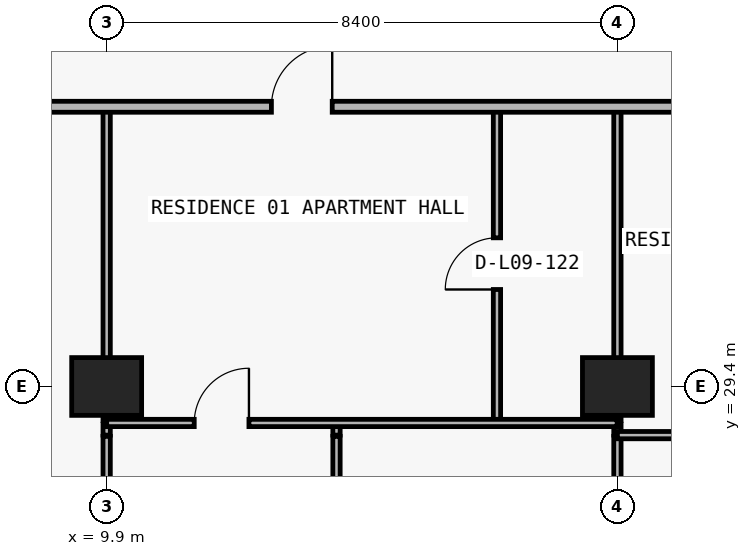
"""IFC4 building model, lengths in metres.
Left out: names, types, materials, properties, quantities, classifications, styles, units other than length and angle.
Written with IfcOpenShell. Run it as: python <this file> out.ifc"""

import sys

from ifc_helpers import new_model, si_unit, direction, frame, frame_2d, origin, origin_2d, place, context, subcontext, project, spatial, rectangle, extrude, element, fill, save


model = new_model("IFC4")
c1 = context("Model", 3, precision=1e-05, world=origin(), true_north=direction((0.0, 1.0)))
c2 = subcontext(c1, "Body", "Model", "MODEL_VIEW")
j1 = project(units=[si_unit("LENGTHUNIT", "METRE"), si_unit("PLANEANGLEUNIT", "RADIAN")], contexts=[c1])
p1 = place(None, origin())
s1 = spatial("IfcSite", under=j1, at=p1, CompositionType="ELEMENT")
p2 = place(p1, origin())
s2 = spatial("IfcBuilding", under=s1, at=p2, CompositionType="ELEMENT")
p3 = place(p2, frame((0.0, 0.0, 39.9)))
s3 = spatial("IfcBuildingStorey", under=s2, at=p3, CompositionType="ELEMENT", Elevation=39.9)
for number, where, z_axis, x_axis in (
    (1, (9.9, 29.4, 0.0), (0.0, 0.0, 1.0), (1.0, 0.0, 0.0)),
    (2, (18.3, 29.4, 0.0), (0.0, 0.0, 1.0), (1.0, 0.0, 0.0)),
):
    element("IfcColumn", number, at=place(p3, frame(where, z_axis=z_axis, x_axis=x_axis)), inside=s3, PredefinedType="COLUMN", context=c2, shape_type="SweptSolid", body=[
        extrude(rectangle(XDim=1.15, YDim=0.95, at=origin_2d()), origin(), (0.0, 0.0, 1.0), 3.05),
    ])
p4 = place(p3, frame((9.9, 24.2, 0.0), z_axis=(0.0, 0.0, 1.0), x_axis=(0.0, 1.0, 0.0)))
e3 = element("IfcWall", 3, at=p4, inside=s3, PredefinedType="PARTITIONING", context=c2, shape_type="SweptSolid", body=[
    extrude(rectangle(XDim=4.38, YDim=0.12, at=frame_2d((2.19, 0.0))), origin(), (0.0, 0.0, 1.0), 2.11),
])
p5 = place(p4, frame((1.74, 0.0, 0.0)))
e4 = element("IfcOpeningElement", 4, at=p5, cuts=e3, PredefinedType="OPENING", context=c2, shape_type="SweptSolid", body=[
    extrude(rectangle(XDim=0.9, YDim=2.06, at=frame_2d((0.45, 1.03))), frame((0.0, 0.07, 0.0), z_axis=(0.0, -1.0, 0.0), x_axis=(1.0, 0.0, 0.0)), (0.0, 0.0, 1.0), 0.14),
])
p6 = place(p3, frame((9.9, 28.6, 0.0), z_axis=(0.0, 0.0, 1.0), x_axis=(0.0, 1.0, 0.0)))
e5 = element("IfcWall", 5, at=p6, inside=s3, PredefinedType="PARTITIONING", context=c2, shape_type="SweptSolid", body=[
    extrude(rectangle(XDim=0.18, YDim=0.12, at=frame_2d((0.09, 0.0))), origin(), (0.0, 0.0, 1.0), 2.11),
])
p7 = place(p3, frame((9.9, 28.84, 0.0), z_axis=(0.0, 0.0, 1.0), x_axis=(0.0, 1.0, 0.0)))
e6 = element("IfcWall", 6, at=p7, inside=s3, PredefinedType="PARTITIONING", context=c2, shape_type="SweptSolid", body=[
    extrude(rectangle(XDim=5.16, YDim=0.12, at=frame_2d((2.58, 0.0))), origin(), (0.0, 0.0, 1.0), 2.11),
])
p8 = place(p3, frame((13.68, 24.2, 0.0), z_axis=(0.0, 0.0, 1.0), x_axis=(0.0, 1.0, 0.0)))
e7 = element("IfcWall", 7, at=p8, inside=s3, PredefinedType="PARTITIONING", context=c2, shape_type="SweptSolid", body=[
    extrude(rectangle(XDim=4.38, YDim=0.12, at=frame_2d((2.19, 0.0))), origin(), (0.0, 0.0, 1.0), 3.05),
])
p9 = place(p8, frame((1.74, 0.0, 0.0)))
e8 = element("IfcOpeningElement", 8, at=p9, cuts=e7, PredefinedType="OPENING", context=c2, shape_type="SweptSolid", body=[
    extrude(rectangle(XDim=0.9, YDim=2.15, at=frame_2d((0.45, 1.075))), frame((0.0, 0.07, 0.0), z_axis=(0.0, -1.0, 0.0), x_axis=(1.0, 0.0, 0.0)), (0.0, 0.0, 1.0), 0.14),
])
p10 = place(p3, frame((13.68, 28.6, 0.0), z_axis=(0.0, 0.0, 1.0), x_axis=(0.0, 1.0, 0.0)))
e9 = element("IfcWall", 9, at=p10, inside=s3, PredefinedType="PARTITIONING", context=c2, shape_type="SweptSolid", body=[
    extrude(rectangle(XDim=0.18, YDim=0.12, at=frame_2d((0.09, 0.0))), origin(), (0.0, 0.0, 1.0), 3.05),
])
p11 = place(p3, frame((16.319, 28.84, 0.0), z_axis=(0.0, 0.0, 1.0), x_axis=(0.0, 1.0, 0.0)))
e10 = element("IfcWall", 10, at=p11, inside=s3, PredefinedType="PARTITIONING", context=c2, shape_type="SweptSolid", body=[
    extrude(rectangle(XDim=5.16, YDim=0.12, at=frame_2d((2.58, 0.0))), origin(), (0.0, 0.0, 1.0), 2.578),
])
p12 = place(p11, frame((2.155, 0.0, 0.0)))
e11 = element("IfcOpeningElement", 11, at=p12, cuts=e10, PredefinedType="OPENING", context=c2, shape_type="SweptSolid", body=[
    extrude(rectangle(XDim=0.85, YDim=2.1, at=frame_2d((0.425, 1.05))), frame((0.0, 0.07, 0.0), z_axis=(0.0, -1.0, 0.0), x_axis=(1.0, 0.0, 0.0)), (0.0, 0.0, 1.0), 0.14),
])
p13 = place(p3, frame((18.3, 24.2, 0.0), z_axis=(0.0, 0.0, 1.0), x_axis=(0.0, 1.0, 0.0)))
e12 = element("IfcWall", 12, at=p13, inside=s3, PredefinedType="PARTITIONING", context=c2, shape_type="SweptSolid", body=[
    extrude(rectangle(XDim=4.38, YDim=0.12, at=frame_2d((2.19, 0.0))), origin(), (0.0, 0.0, 1.0), 2.11),
])
p14 = place(p13, frame((1.74, 0.0, 0.0)))
e13 = element("IfcOpeningElement", 13, at=p14, cuts=e12, PredefinedType="OPENING", context=c2, shape_type="SweptSolid", body=[
    extrude(rectangle(XDim=0.9, YDim=2.06, at=frame_2d((0.45, 1.03))), frame((0.0, 0.07, 0.0), z_axis=(0.0, -1.0, 0.0), x_axis=(1.0, 0.0, 0.0)), (0.0, 0.0, 1.0), 0.14),
])
p15 = place(p3, frame((18.3, 28.6, 0.0), z_axis=(0.0, 0.0, 1.0), x_axis=(0.0, 1.0, 0.0)))
e14 = element("IfcWall", 14, at=p15, inside=s3, PredefinedType="PARTITIONING", context=c2, shape_type="SweptSolid", body=[
    extrude(rectangle(XDim=0.18, YDim=0.12, at=frame_2d((0.09, 0.0))), origin(), (0.0, 0.0, 1.0), 2.11),
])
p16 = place(p3, frame((18.3, 28.84, 0.0), z_axis=(0.0, 0.0, 1.0), x_axis=(0.0, 1.0, 0.0)))
e15 = element("IfcWall", 15, at=p16, inside=s3, PredefinedType="PARTITIONING", context=c2, shape_type="SweptSolid", body=[
    extrude(rectangle(XDim=5.16, YDim=0.12, at=frame_2d((2.58, 0.0))), origin(), (0.0, 0.0, 1.0), 2.11),
])
p17 = place(p3, frame((18.3, 28.6, 0.0), z_axis=(0.0, 0.0, 1.0), x_axis=(1.0, 0.0, 0.0)))
e16 = element("IfcWall", 16, at=p17, inside=s3, PredefinedType="PARTITIONING", context=c2, shape_type="SweptSolid", body=[
    extrude(rectangle(XDim=8.13, YDim=0.12, at=frame_2d((4.065, 0.0))), origin(), (0.0, 0.0, 1.0), 3.05),
])
p18 = place(p17, frame((2.861, 0.0, 0.0)))
e17 = element("IfcOpeningElement", 17, at=p18, cuts=e16, PredefinedType="OPENING", context=c2, shape_type="SweptSolid", body=[
    extrude(rectangle(XDim=0.9, YDim=2.15, at=frame_2d((0.45, 1.075))), frame((0.0, 0.07, 0.0), z_axis=(0.0, -1.0, 0.0), x_axis=(1.0, 0.0, 0.0)), (0.0, 0.0, 1.0), 0.14),
])
p19 = place(p3, frame((9.9, 28.8, 0.0), z_axis=(0.0, 0.0, 1.0), x_axis=(1.0, 0.0, 0.0)))
e18 = element("IfcWall", 18, at=p19, inside=s3, PredefinedType="PARTITIONING", context=c2, shape_type="SweptSolid", body=[
    extrude(rectangle(XDim=8.395, YDim=0.12, at=frame_2d((4.198, 0.0))), origin(), (0.0, 0.0, 1.0), 3.05),
])
p20 = place(p19, frame((1.44, 0.0, 0.0)))
e19 = element("IfcOpeningElement", 19, at=p20, cuts=e18, PredefinedType="OPENING", context=c2, shape_type="SweptSolid", body=[
    extrude(rectangle(XDim=0.9, YDim=2.15, at=frame_2d((0.45, 1.075))), frame((0.0, 0.07, 0.0), z_axis=(0.0, -1.0, 0.0), x_axis=(1.0, 0.0, 0.0)), (0.0, 0.0, 1.0), 0.14),
])
p21 = place(p3, frame((5.105, 34.0, 0.0), z_axis=(0.0, 0.0, 1.0), x_axis=(1.0, 0.0, 0.0)))
e20 = element("IfcWall", 20, at=p21, inside=s3, PredefinedType="PARTITIONING", context=c2, shape_type="SweptSolid", body=[
    extrude(rectangle(XDim=67.595, YDim=0.18, at=frame_2d((33.797, 0.0))), origin(), (0.0, 0.0, 1.0), 3.05),
])
p22 = place(p21, frame((7.504, 0.0, 0.0)))
e21 = element("IfcOpeningElement", 21, at=p22, cuts=e20, PredefinedType="OPENING", context=c2, shape_type="SweptSolid", body=[
    extrude(rectangle(XDim=1.0, YDim=2.2, at=frame_2d((0.5, 1.1))), frame((0.0, 0.1, 0.0), z_axis=(0.0, -1.0, 0.0), x_axis=(1.0, 0.0, 0.0)), (0.0, 0.0, 1.0), 0.2),
])
p23 = place(p21, frame((24.213, 0.0, 0.0)))
e22 = element("IfcOpeningElement", 22, at=p23, cuts=e20, PredefinedType="OPENING", context=c2, shape_type="SweptSolid", body=[
    extrude(rectangle(XDim=1.0, YDim=2.2, at=frame_2d((0.5, 1.1))), frame((0.0, 0.1, 0.0), z_axis=(0.0, -1.0, 0.0), x_axis=(1.0, 0.0, 0.0)), (0.0, 0.0, 1.0), 0.2),
])
p24 = place(p21, frame((32.365, 0.0, 0.0)))
e23 = element("IfcOpeningElement", 23, at=p24, cuts=e20, PredefinedType="OPENING", context=c2, shape_type="SweptSolid", body=[
    extrude(rectangle(XDim=1.0, YDim=2.2, at=frame_2d((0.5, 1.1))), frame((0.0, 0.1, 0.0), z_axis=(0.0, -1.0, 0.0), x_axis=(1.0, 0.0, 0.0)), (0.0, 0.0, 1.0), 0.2),
])
p25 = place(p21, frame((40.24, 0.0, 0.0)))
e24 = element("IfcOpeningElement", 24, at=p25, cuts=e20, PredefinedType="OPENING", context=c2, shape_type="SweptSolid", body=[
    extrude(rectangle(XDim=1.0, YDim=2.2, at=frame_2d((0.5, 1.1))), frame((0.0, 0.1, 0.0), z_axis=(0.0, -1.0, 0.0), x_axis=(1.0, 0.0, 0.0)), (0.0, 0.0, 1.0), 0.2),
])
p26 = place(p21, frame((48.708, 0.0, 0.0)))
e25 = element("IfcOpeningElement", 25, at=p26, cuts=e20, PredefinedType="OPENING", context=c2, shape_type="SweptSolid", body=[
    extrude(rectangle(XDim=1.0, YDim=2.2, at=frame_2d((0.5, 1.1))), frame((0.0, 0.1, 0.0), z_axis=(0.0, -1.0, 0.0), x_axis=(1.0, 0.0, 0.0)), (0.0, 0.0, 1.0), 0.2),
])
p27 = place(p22, origin())
e26 = element("IfcDoor", 26, at=p27, inside=s3, OperationType="SINGLE_SWING_RIGHT", PredefinedType="DOOR", context=c2, shape_type="SweptSolid", body=[
    extrude(rectangle(XDim=1.0, YDim=2.2, at=frame_2d((0.5, 1.1))), frame((0.0, 0.025, 0.0), z_axis=(0.0, -1.0, 0.0), x_axis=(1.0, 0.0, 0.0)), (0.0, 0.0, 1.0), 0.05),
])
fill(e21, e26)
p28 = place(p12, origin())
e27 = element("IfcDoor", 27, at=p28, inside=s3, OperationType="SINGLE_SWING_LEFT", PredefinedType="DOOR", context=c2, shape_type="SweptSolid", body=[
    extrude(rectangle(XDim=0.85, YDim=2.1, at=frame_2d((0.425, 1.05))), frame((0.0, 0.025, 0.0), z_axis=(0.0, -1.0, 0.0), x_axis=(1.0, 0.0, 0.0)), (0.0, 0.0, 1.0), 0.05),
])
fill(e11, e27)
p29 = place(p20, origin())
e28 = element("IfcDoor", 28, at=p29, inside=s3, OperationType="SINGLE_SWING_RIGHT", PredefinedType="DOOR", context=c2, shape_type="SweptSolid", body=[
    extrude(rectangle(XDim=0.9, YDim=2.15, at=frame_2d((0.45, 1.075))), frame((0.0, 0.025, 0.0), z_axis=(0.0, -1.0, 0.0), x_axis=(1.0, 0.0, 0.0)), (0.0, 0.0, 1.0), 0.05),
])
fill(e19, e28)
save(model, sys.argv[1])
